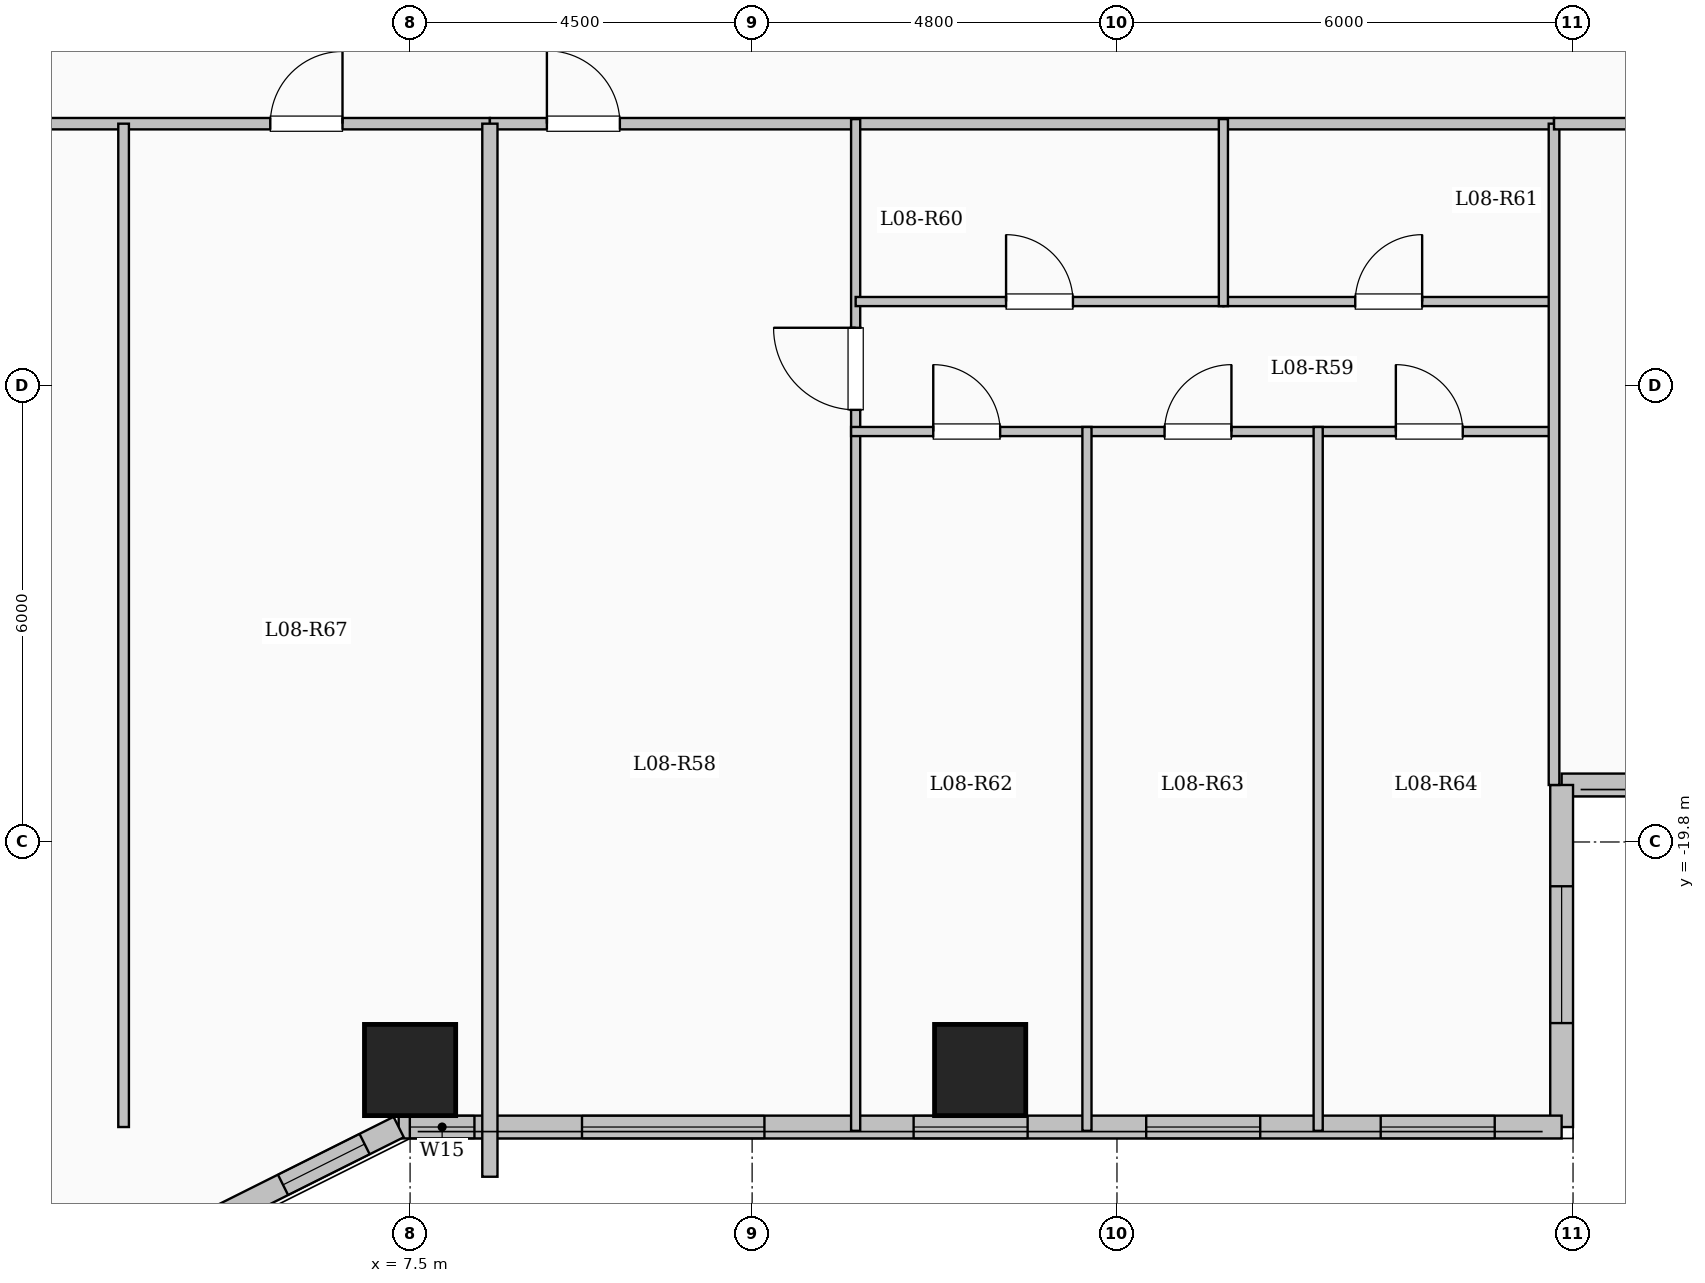
"""IFC4 building model, lengths in metres.
Left out: names, types, materials, properties, quantities, classifications, styles, units other than length and angle.
Written with IfcOpenShell. Run it as: python <this file> out.ifc"""

import sys

from ifc_helpers import new_model, si_unit, direction, frame, frame_2d, origin, origin_2d, place, context, subcontext, project, spatial, rectangle, extrude, element, fill, save


model = new_model("IFC4")
c1 = context("Model", 3, precision=1e-05, world=origin(), true_north=direction((0.0, 1.0)))
c2 = subcontext(c1, "Body", "Model", "MODEL_VIEW")
j1 = project(units=[si_unit("LENGTHUNIT", "METRE"), si_unit("PLANEANGLEUNIT", "RADIAN")], contexts=[c1])
p1 = place(None, origin())
s1 = spatial("IfcSite", under=j1, at=p1, CompositionType="ELEMENT")
p2 = place(p1, origin())
s2 = spatial("IfcBuilding", under=s1, at=p2, CompositionType="ELEMENT")
p3 = place(p2, frame((0.0, 0.0, 34.05)))
s3 = spatial("IfcBuildingStorey", under=s2, at=p3, CompositionType="ELEMENT", Elevation=34.05)
for number, where, z_axis, x_axis in (
    (1, (7.5, -22.8, 0.0), (0.0, 0.0, 1.0), (1.0, 0.0, 0.0)),
    (2, (15.0, -22.8, 0.0), (0.0, 0.0, 1.0), (1.0, 0.0, 0.0)),
):
    element("IfcColumn", number, at=place(p3, frame(where, z_axis=z_axis, x_axis=x_axis)), inside=s3, PredefinedType="COLUMN", context=c2, shape_type="SweptSolid", body=[
        extrude(rectangle(XDim=1.2, YDim=1.2, at=origin_2d()), origin(), (0.0, 0.0, 1.0), 3.35),
    ])
p4 = place(p3, frame((28.65, -19.05, 0.0), z_axis=(0.0, 0.0, 1.0), x_axis=(-1.0, 0.0, 0.0)))
e3 = element("IfcWall", 3, at=p4, inside=s3, PredefinedType="SOLIDWALL", context=c2, shape_type="SweptSolid", body=[
    extrude(rectangle(XDim=6.0, YDim=0.3, at=frame_2d((3.0, 0.0))), origin(), (0.0, 0.0, 1.0), 3.1),
])
p5 = place(p4, frame((1.825, 0.0, 0.9)))
e4 = element("IfcOpeningElement", 4, at=p5, cuts=e3, PredefinedType="OPENING", context=c2, shape_type="SweptSolid", body=[
    extrude(rectangle(XDim=2.4, YDim=1.8, at=frame_2d((1.2, 0.9))), frame((0.0, 0.16, 0.0), z_axis=(0.0, -1.0, 0.0), x_axis=(1.0, 0.0, 0.0)), (0.0, 0.0, 1.0), 0.32),
])
p6 = place(p3, frame((22.65, -19.05, 0.0), z_axis=(0.0, 0.0, 1.0), x_axis=(0.0, -1.0, 0.0)))
e5 = element("IfcWall", 5, at=p6, inside=s3, PredefinedType="SOLIDWALL", context=c2, shape_type="SweptSolid", body=[
    extrude(rectangle(XDim=4.5, YDim=0.3, at=frame_2d((2.25, 0.0))), origin(), (0.0, 0.0, 1.0), 3.1),
])
p7 = place(p6, frame((1.333, 0.0, 0.9)))
e6 = element("IfcOpeningElement", 6, at=p7, cuts=e5, PredefinedType="OPENING", context=c2, shape_type="SweptSolid", body=[
    extrude(rectangle(XDim=1.8, YDim=1.65, at=frame_2d((0.9, 0.825))), frame((0.0, 0.16, 0.0), z_axis=(0.0, -1.0, 0.0), x_axis=(1.0, 0.0, 0.0)), (0.0, 0.0, 1.0), 0.32),
])
p8 = place(p3, frame((22.65, -23.55, 0.0), z_axis=(0.0, 0.0, 1.0), x_axis=(-1.0, 0.0, 0.0)))
e7 = element("IfcWall", 7, at=p8, inside=s3, PredefinedType="SOLIDWALL", context=c2, shape_type="SweptSolid", body=[
    extrude(rectangle(XDim=15.3, YDim=0.3, at=frame_2d((7.65, 0.0))), origin(), (0.0, 0.0, 1.0), 3.1),
])
p9 = place(p8, frame((0.88, 0.0, 0.9)))
e8 = element("IfcOpeningElement", 8, at=p9, cuts=e7, PredefinedType="OPENING", context=c2, shape_type="SweptSolid", body=[
    extrude(rectangle(XDim=1.5, YDim=1.65, at=frame_2d((0.75, 0.825))), frame((0.0, 0.16, 0.0), z_axis=(0.0, -1.0, 0.0), x_axis=(1.0, 0.0, 0.0)), (0.0, 0.0, 1.0), 0.32),
])
p10 = place(p8, frame((3.965, 0.0, 0.9)))
e9 = element("IfcOpeningElement", 9, at=p10, cuts=e7, PredefinedType="OPENING", context=c2, shape_type="SweptSolid", body=[
    extrude(rectangle(XDim=1.5, YDim=1.65, at=frame_2d((0.75, 0.825))), frame((0.0, 0.16, 0.0), z_axis=(0.0, -1.0, 0.0), x_axis=(1.0, 0.0, 0.0)), (0.0, 0.0, 1.0), 0.32),
])
p11 = place(p8, frame((7.025, 0.0, 0.9)))
e10 = element("IfcOpeningElement", 10, at=p11, cuts=e7, PredefinedType="OPENING", context=c2, shape_type="SweptSolid", body=[
    extrude(rectangle(XDim=1.5, YDim=1.65, at=frame_2d((0.75, 0.825))), frame((0.0, 0.16, 0.0), z_axis=(0.0, -1.0, 0.0), x_axis=(1.0, 0.0, 0.0)), (0.0, 0.0, 1.0), 0.32),
])
p12 = place(p8, frame((10.488, 0.0, 0.9)))
e11 = element("IfcOpeningElement", 11, at=p12, cuts=e7, PredefinedType="OPENING", context=c2, shape_type="SweptSolid", body=[
    extrude(rectangle(XDim=2.4, YDim=1.8, at=frame_2d((1.2, 0.9))), frame((0.0, 0.16, 0.0), z_axis=(0.0, -1.0, 0.0), x_axis=(1.0, 0.0, 0.0)), (0.0, 0.0, 1.0), 0.32),
])
p13 = place(p8, frame((14.303, 0.0, 0.95)))
e12 = element("IfcOpeningElement", 12, at=p13, cuts=e7, PredefinedType="OPENING", context=c2, shape_type="SweptSolid", body=[
    extrude(rectangle(XDim=0.85, YDim=1.5, at=frame_2d((0.425, 0.75))), frame((0.0, 0.16, 0.0), z_axis=(0.0, -1.0, 0.0), x_axis=(1.0, 0.0, 0.0)), (0.0, 0.0, 1.0), 0.32),
])
p14 = place(p3, frame((7.35, -23.55, 0.0), z_axis=(0.0, 0.0, 1.0), x_axis=(-0.894427191, -0.4472135955, 0.0)))
e13 = element("IfcWall", 13, at=p14, inside=s3, PredefinedType="SOLIDWALL", context=c2, shape_type="SweptSolid", body=[
    extrude(rectangle(XDim=3.354, YDim=0.3, at=frame_2d((1.677, 0.0))), origin(), (0.0, 0.0, 1.0), 3.1),
])
p15 = place(p14, frame((0.501, 0.0, 0.95)))
e14 = element("IfcOpeningElement", 14, at=p15, cuts=e13, PredefinedType="OPENING", context=c2, shape_type="SweptSolid", body=[
    extrude(rectangle(XDim=1.2, YDim=1.5, at=frame_2d((0.6, 0.75))), frame((0.0, 0.16, 0.0), z_axis=(0.0, -1.0, 0.0), x_axis=(1.0, 0.0, 0.0)), (0.0, 0.0, 1.0), 0.32),
])
p16 = place(p3, frame((-8.55, -10.35, 0.0), z_axis=(0.0, 0.0, 1.0), x_axis=(1.0, 0.0, 0.0)))
e15 = element("IfcWall", 15, at=p16, inside=s3, PredefinedType="PARTITIONING", context=c2, shape_type="SweptSolid", body=[
    extrude(rectangle(XDim=17.1, YDim=0.15, at=frame_2d((8.55, 0.0))), origin(), (0.0, 0.0, 1.0), 3.1),
])
p17 = place(p16, frame((2.618, 0.0, 0.0)))
e16 = element("IfcOpeningElement", 16, at=p17, cuts=e15, PredefinedType="OPENING", context=c2, shape_type="SweptSolid", body=[
    extrude(rectangle(XDim=0.95, YDim=2.15, at=frame_2d((0.475, 1.075))), frame((0.0, 0.085, 0.0), z_axis=(0.0, -1.0, 0.0), x_axis=(1.0, 0.0, 0.0)), (0.0, 0.0, 1.0), 0.17),
])
p18 = place(p16, frame((8.754, 0.0, 0.0)))
e17 = element("IfcOpeningElement", 17, at=p18, cuts=e15, PredefinedType="OPENING", context=c2, shape_type="SweptSolid", body=[
    extrude(rectangle(XDim=0.95, YDim=2.15, at=frame_2d((0.475, 1.075))), frame((0.0, 0.085, 0.0), z_axis=(0.0, -1.0, 0.0), x_axis=(1.0, 0.0, 0.0)), (0.0, 0.0, 1.0), 0.17),
])
p19 = place(p16, frame((14.211, 0.0, 0.0)))
e18 = element("IfcOpeningElement", 18, at=p19, cuts=e15, PredefinedType="OPENING", context=c2, shape_type="SweptSolid", body=[
    extrude(rectangle(XDim=0.95, YDim=2.15, at=frame_2d((0.475, 1.075))), frame((0.0, 0.085, 0.0), z_axis=(0.0, -1.0, 0.0), x_axis=(1.0, 0.0, 0.0)), (0.0, 0.0, 1.0), 0.17),
])
p20 = place(p3, frame((8.55, -10.35, 0.0), z_axis=(0.0, 0.0, 1.0), x_axis=(1.0, 0.0, 0.0)))
e19 = element("IfcWall", 19, at=p20, inside=s3, PredefinedType="PARTITIONING", context=c2, shape_type="SweptSolid", body=[
    extrude(rectangle(XDim=14.0, YDim=0.15, at=frame_2d((7.0, 0.0))), origin(), (0.0, 0.0, 1.0), 3.1),
])
p21 = place(p20, frame((0.75, 0.0, 0.0)))
e20 = element("IfcOpeningElement", 20, at=p21, cuts=e19, PredefinedType="OPENING", context=c2, shape_type="SweptSolid", body=[
    extrude(rectangle(XDim=0.96, YDim=2.15, at=frame_2d((0.48, 1.075))), frame((0.0, 0.085, 0.0), z_axis=(0.0, -1.0, 0.0), x_axis=(1.0, 0.0, 0.0)), (0.0, 0.0, 1.0), 0.17),
])
p22 = place(p3, frame((13.362, -23.6, 0.0), z_axis=(0.0, 0.0, 1.0), x_axis=(0.0, 1.0, 0.0)))
e21 = element("IfcWall", 21, at=p22, inside=s3, PredefinedType="PARTITIONING", context=c2, shape_type="SweptSolid", body=[
    extrude(rectangle(XDim=13.31, YDim=0.12, at=frame_2d((6.655, 0.0))), origin(), (0.0, 0.0, 1.0), 3.1),
])
p23 = place(p22, frame((9.485, 0.0, 0.0)))
e22 = element("IfcOpeningElement", 22, at=p23, cuts=e21, PredefinedType="OPENING", context=c2, shape_type="SweptSolid", body=[
    extrude(rectangle(XDim=1.08, YDim=2.15, at=frame_2d((0.54, 1.075))), frame((0.0, 0.07, 0.0), z_axis=(0.0, -1.0, 0.0), x_axis=(1.0, 0.0, 0.0)), (0.0, 0.0, 1.0), 0.14),
])
p24 = place(p3, frame((13.362, -12.69, 0.0), z_axis=(0.0, 0.0, 1.0), x_axis=(1.0, 0.0, 0.0)))
e23 = element("IfcWall", 23, at=p24, inside=s3, PredefinedType="PARTITIONING", context=c2, shape_type="SweptSolid", body=[
    extrude(rectangle(XDim=4.838, YDim=0.12, at=frame_2d((2.419, 0.0))), origin(), (0.0, 0.0, 1.0), 2.585),
])
p25 = place(p24, frame((1.979, 0.0, 0.0)))
e24 = element("IfcOpeningElement", 24, at=p25, cuts=e23, PredefinedType="OPENING", context=c2, shape_type="SweptSolid", body=[
    extrude(rectangle(XDim=0.88, YDim=2.1, at=frame_2d((0.44, 1.05))), frame((0.0, 0.07, 0.0), z_axis=(0.0, -1.0, 0.0), x_axis=(1.0, 0.0, 0.0)), (0.0, 0.0, 1.0), 0.14),
])
p26 = place(p3, frame((18.2, -12.69, 0.0), z_axis=(0.0, 0.0, 1.0), x_axis=(1.0, 0.0, 0.0)))
e25 = element("IfcWall", 25, at=p26, inside=s3, PredefinedType="PARTITIONING", context=c2, shape_type="SweptSolid", body=[
    extrude(rectangle(XDim=4.35, YDim=0.12, at=frame_2d((2.175, 0.0))), origin(), (0.0, 0.0, 1.0), 3.1),
])
p27 = place(p26, frame((1.735, 0.0, 0.0)))
e26 = element("IfcOpeningElement", 26, at=p27, cuts=e25, PredefinedType="OPENING", context=c2, shape_type="SweptSolid", body=[
    extrude(rectangle(XDim=0.88, YDim=2.1, at=frame_2d((0.44, 1.05))), frame((0.0, 0.07, 0.0), z_axis=(0.0, -1.0, 0.0), x_axis=(1.0, 0.0, 0.0)), (0.0, 0.0, 1.0), 0.14),
])
p28 = place(p3, frame((13.302, -14.4, 0.0), z_axis=(0.0, 0.0, 1.0), x_axis=(1.0, 0.0, 0.0)))
e27 = element("IfcWall", 27, at=p28, inside=s3, PredefinedType="PARTITIONING", context=c2, shape_type="SweptSolid", body=[
    extrude(rectangle(XDim=9.308, YDim=0.12, at=frame_2d((4.654, 0.0))), origin(), (0.0, 0.0, 1.0), 3.1),
])
p29 = place(p28, frame((1.081, 0.0, 0.0)))
e28 = element("IfcOpeningElement", 28, at=p29, cuts=e27, PredefinedType="OPENING", context=c2, shape_type="SweptSolid", body=[
    extrude(rectangle(XDim=0.88, YDim=2.1, at=frame_2d((0.44, 1.05))), frame((0.0, 0.07, 0.0), z_axis=(0.0, -1.0, 0.0), x_axis=(1.0, 0.0, 0.0)), (0.0, 0.0, 1.0), 0.14),
])
p30 = place(p28, frame((4.124, 0.0, 0.0)))
e29 = element("IfcOpeningElement", 29, at=p30, cuts=e27, PredefinedType="OPENING", context=c2, shape_type="SweptSolid", body=[
    extrude(rectangle(XDim=0.88, YDim=2.1, at=frame_2d((0.44, 1.05))), frame((0.0, 0.07, 0.0), z_axis=(0.0, -1.0, 0.0), x_axis=(1.0, 0.0, 0.0)), (0.0, 0.0, 1.0), 0.14),
])
p31 = place(p28, frame((7.167, 0.0, 0.0)))
e30 = element("IfcOpeningElement", 30, at=p31, cuts=e27, PredefinedType="OPENING", context=c2, shape_type="SweptSolid", body=[
    extrude(rectangle(XDim=0.88, YDim=2.1, at=frame_2d((0.44, 1.05))), frame((0.0, 0.07, 0.0), z_axis=(0.0, -1.0, 0.0), x_axis=(1.0, 0.0, 0.0)), (0.0, 0.0, 1.0), 0.14),
])
p32 = place(p3, frame((18.2, -12.75, 0.0), z_axis=(0.0, 0.0, 1.0), x_axis=(0.0, 1.0, 0.0)))
e31 = element("IfcWall", 31, at=p32, inside=s3, PredefinedType="PARTITIONING", context=c2, shape_type="SweptSolid", body=[
    extrude(rectangle(XDim=2.46, YDim=0.12, at=frame_2d((1.23, 0.0))), origin(), (0.0, 0.0, 1.0), 3.1),
])
for number, where, z_axis, x_axis in (
    (32, (16.405, -23.6, 0.0), (0.0, 0.0, 1.0), (0.0, 1.0, 0.0)),
    (33, (19.447, -23.6, 0.0), (0.0, 0.0, 1.0), (0.0, 1.0, 0.0)),
):
    element("IfcWall", number, at=place(p3, frame(where, z_axis=z_axis, x_axis=x_axis)), inside=s3, PredefinedType="PARTITIONING", context=c2, shape_type="SweptSolid", body=[
        extrude(rectangle(XDim=9.26, YDim=0.12, at=frame_2d((4.63, 0.0))), origin(), (0.0, 0.0, 1.0), 3.1),
    ])
p33 = place(p3, frame((8.55, -24.204, 0.0), z_axis=(0.0, 0.0, 1.0), x_axis=(0.0, 1.0, 0.0)))
e34 = element("IfcWall", 34, at=p33, inside=s3, PredefinedType="SOLIDWALL", context=c2, shape_type="SweptSolid", body=[
    extrude(rectangle(XDim=13.854, YDim=0.2, at=frame_2d((6.927, 0.0))), origin(), (0.0, 0.0, 1.0), 3.1),
])
p34 = place(p3, frame((3.731, -23.55, 0.0), z_axis=(0.0, 0.0, 1.0), x_axis=(0.0, 1.0, 0.0)))
e35 = element("IfcWall", 35, at=p34, inside=s3, PredefinedType="PARTITIONING", context=c2, shape_type="SweptSolid", body=[
    extrude(rectangle(XDim=13.2, YDim=0.14, at=frame_2d((6.6, 0.0))), origin(), (0.0, 0.0, 1.0), 3.1),
])
p35 = place(p3, frame((22.55, -19.05, 0.0), z_axis=(0.0, 0.0, 1.0), x_axis=(0.0, 1.0, 0.0)))
e36 = element("IfcWall", 36, at=p35, inside=s3, PredefinedType="PARTITIONING", context=c2, shape_type="SweptSolid", body=[
    extrude(rectangle(XDim=8.7, YDim=0.14, at=frame_2d((4.35, 0.0))), origin(), (0.0, 0.0, 1.0), 3.1),
])
p36 = place(p3, frame((22.55, -10.35, 0.0), z_axis=(0.0, 0.0, 1.0), x_axis=(1.0, 0.0, 0.0)))
e37 = element("IfcWall", 37, at=p36, inside=s3, PredefinedType="PARTITIONING", context=c2, shape_type="SweptSolid", body=[
    extrude(rectangle(XDim=6.13, YDim=0.15, at=frame_2d((3.065, 0.0))), origin(), (0.0, 0.0, 1.0), 3.1),
])
p37 = place(p36, frame((2.59, 0.0, 0.0)))
e38 = element("IfcOpeningElement", 38, at=p37, cuts=e37, PredefinedType="OPENING", context=c2, shape_type="SweptSolid", body=[
    extrude(rectangle(XDim=0.95, YDim=2.15, at=frame_2d((0.475, 1.075))), frame((0.0, 0.085, 0.0), z_axis=(0.0, -1.0, 0.0), x_axis=(1.0, 0.0, 0.0)), (0.0, 0.0, 1.0), 0.17),
])
p38 = place(p7, origin())
e39 = element("IfcWindow", 39, at=p38, inside=s3, PartitioningType="SINGLE_PANEL", PredefinedType="WINDOW", context=c2, shape_type="SweptSolid", body=[
    extrude(rectangle(XDim=1.8, YDim=1.65, at=frame_2d((0.9, 0.825))), frame((0.0, 0.03, 0.0), z_axis=(0.0, -1.0, 0.0), x_axis=(1.0, 0.0, 0.0)), (0.0, 0.0, 1.0), 0.06),
])
fill(e6, e39)
p39 = place(p9, origin())
e40 = element("IfcWindow", 40, at=p39, inside=s3, PartitioningType="SINGLE_PANEL", PredefinedType="WINDOW", context=c2, shape_type="SweptSolid", body=[
    extrude(rectangle(XDim=1.5, YDim=1.65, at=frame_2d((0.75, 0.825))), frame((0.0, 0.03, 0.0), z_axis=(0.0, -1.0, 0.0), x_axis=(1.0, 0.0, 0.0)), (0.0, 0.0, 1.0), 0.06),
])
fill(e8, e40)
p40 = place(p10, origin())
e41 = element("IfcWindow", 41, at=p40, inside=s3, PartitioningType="SINGLE_PANEL", PredefinedType="WINDOW", context=c2, shape_type="SweptSolid", body=[
    extrude(rectangle(XDim=1.5, YDim=1.65, at=frame_2d((0.75, 0.825))), frame((0.0, 0.03, 0.0), z_axis=(0.0, -1.0, 0.0), x_axis=(1.0, 0.0, 0.0)), (0.0, 0.0, 1.0), 0.06),
])
fill(e9, e41)
p41 = place(p11, origin())
e42 = element("IfcWindow", 42, at=p41, inside=s3, PartitioningType="SINGLE_PANEL", PredefinedType="WINDOW", context=c2, shape_type="SweptSolid", body=[
    extrude(rectangle(XDim=1.5, YDim=1.65, at=frame_2d((0.75, 0.825))), frame((0.0, 0.03, 0.0), z_axis=(0.0, -1.0, 0.0), x_axis=(1.0, 0.0, 0.0)), (0.0, 0.0, 1.0), 0.06),
])
fill(e10, e42)
p42 = place(p12, origin())
e43 = element("IfcWindow", 43, at=p42, inside=s3, PartitioningType="SINGLE_PANEL", PredefinedType="WINDOW", context=c2, shape_type="SweptSolid", body=[
    extrude(rectangle(XDim=2.4, YDim=1.8, at=frame_2d((1.2, 0.9))), frame((0.0, 0.03, 0.0), z_axis=(0.0, -1.0, 0.0), x_axis=(1.0, 0.0, 0.0)), (0.0, 0.0, 1.0), 0.06),
])
fill(e11, e43)
p43 = place(p13, origin())
e44 = element("IfcWindow", 44, at=p43, inside=s3, PartitioningType="SINGLE_PANEL", PredefinedType="WINDOW", context=c2, shape_type="SweptSolid", body=[
    extrude(rectangle(XDim=0.85, YDim=1.5, at=frame_2d((0.425, 0.75))), frame((0.0, 0.03, 0.0), z_axis=(0.0, -1.0, 0.0), x_axis=(1.0, 0.0, 0.0)), (0.0, 0.0, 1.0), 0.06),
])
fill(e12, e44)
p44 = place(p15, origin())
e45 = element("IfcWindow", 45, at=p44, inside=s3, PartitioningType="SINGLE_PANEL", PredefinedType="WINDOW", context=c2, shape_type="SweptSolid", body=[
    extrude(rectangle(XDim=1.2, YDim=1.5, at=frame_2d((0.6, 0.75))), frame((0.0, 0.03, 0.0), z_axis=(0.0, -1.0, 0.0), x_axis=(1.0, 0.0, 0.0)), (0.0, 0.0, 1.0), 0.06),
])
fill(e14, e45)
p45 = place(p21, origin())
e46 = element("IfcDoor", 46, at=p45, inside=s3, OperationType="SINGLE_SWING_LEFT", PredefinedType="DOOR", context=c2, shape_type="SweptSolid", body=[
    extrude(rectangle(XDim=0.96, YDim=2.15, at=frame_2d((0.48, 1.075))), frame((0.0, 0.025, 0.0), z_axis=(0.0, -1.0, 0.0), x_axis=(1.0, 0.0, 0.0)), (0.0, 0.0, 1.0), 0.05),
])
fill(e20, e46)
p46 = place(p23, origin())
e47 = element("IfcDoor", 47, at=p46, inside=s3, OperationType="SINGLE_SWING_RIGHT", PredefinedType="DOOR", context=c2, shape_type="SweptSolid", body=[
    extrude(rectangle(XDim=1.08, YDim=2.15, at=frame_2d((0.54, 1.075))), frame((0.0, 0.025, 0.0), z_axis=(0.0, -1.0, 0.0), x_axis=(1.0, 0.0, 0.0)), (0.0, 0.0, 1.0), 0.05),
])
fill(e22, e47)
p47 = place(p25, origin())
e48 = element("IfcDoor", 48, at=p47, inside=s3, OperationType="SINGLE_SWING_LEFT", PredefinedType="DOOR", context=c2, shape_type="SweptSolid", body=[
    extrude(rectangle(XDim=0.88, YDim=2.1, at=frame_2d((0.44, 1.05))), frame((0.0, 0.025, 0.0), z_axis=(0.0, -1.0, 0.0), x_axis=(1.0, 0.0, 0.0)), (0.0, 0.0, 1.0), 0.05),
])
fill(e24, e48)
p48 = place(p27, origin())
e49 = element("IfcDoor", 49, at=p48, inside=s3, OperationType="SINGLE_SWING_RIGHT", PredefinedType="DOOR", context=c2, shape_type="SweptSolid", body=[
    extrude(rectangle(XDim=0.88, YDim=2.1, at=frame_2d((0.44, 1.05))), frame((0.0, 0.025, 0.0), z_axis=(0.0, -1.0, 0.0), x_axis=(1.0, 0.0, 0.0)), (0.0, 0.0, 1.0), 0.05),
])
fill(e26, e49)
p49 = place(p29, origin())
e50 = element("IfcDoor", 50, at=p49, inside=s3, OperationType="SINGLE_SWING_LEFT", PredefinedType="DOOR", context=c2, shape_type="SweptSolid", body=[
    extrude(rectangle(XDim=0.88, YDim=2.1, at=frame_2d((0.44, 1.05))), frame((0.0, 0.025, 0.0), z_axis=(0.0, -1.0, 0.0), x_axis=(1.0, 0.0, 0.0)), (0.0, 0.0, 1.0), 0.05),
])
fill(e28, e50)
p50 = place(p30, origin())
e51 = element("IfcDoor", 51, at=p50, inside=s3, OperationType="SINGLE_SWING_RIGHT", PredefinedType="DOOR", context=c2, shape_type="SweptSolid", body=[
    extrude(rectangle(XDim=0.88, YDim=2.1, at=frame_2d((0.44, 1.05))), frame((0.0, 0.025, 0.0), z_axis=(0.0, -1.0, 0.0), x_axis=(1.0, 0.0, 0.0)), (0.0, 0.0, 1.0), 0.05),
])
fill(e29, e51)
p51 = place(p31, origin())
e52 = element("IfcDoor", 52, at=p51, inside=s3, OperationType="SINGLE_SWING_LEFT", PredefinedType="DOOR", context=c2, shape_type="SweptSolid", body=[
    extrude(rectangle(XDim=0.88, YDim=2.1, at=frame_2d((0.44, 1.05))), frame((0.0, 0.025, 0.0), z_axis=(0.0, -1.0, 0.0), x_axis=(1.0, 0.0, 0.0)), (0.0, 0.0, 1.0), 0.05),
])
fill(e30, e52)
p52 = place(p19, origin())
e53 = element("IfcDoor", 53, at=p52, inside=s3, OperationType="SINGLE_SWING_RIGHT", PredefinedType="DOOR", context=c2, shape_type="SweptSolid", body=[
    extrude(rectangle(XDim=0.95, YDim=2.15, at=frame_2d((0.475, 1.075))), frame((0.0, 0.025, 0.0), z_axis=(0.0, -1.0, 0.0), x_axis=(1.0, 0.0, 0.0)), (0.0, 0.0, 1.0), 0.05),
])
fill(e18, e53)
save(model, sys.argv[1])
